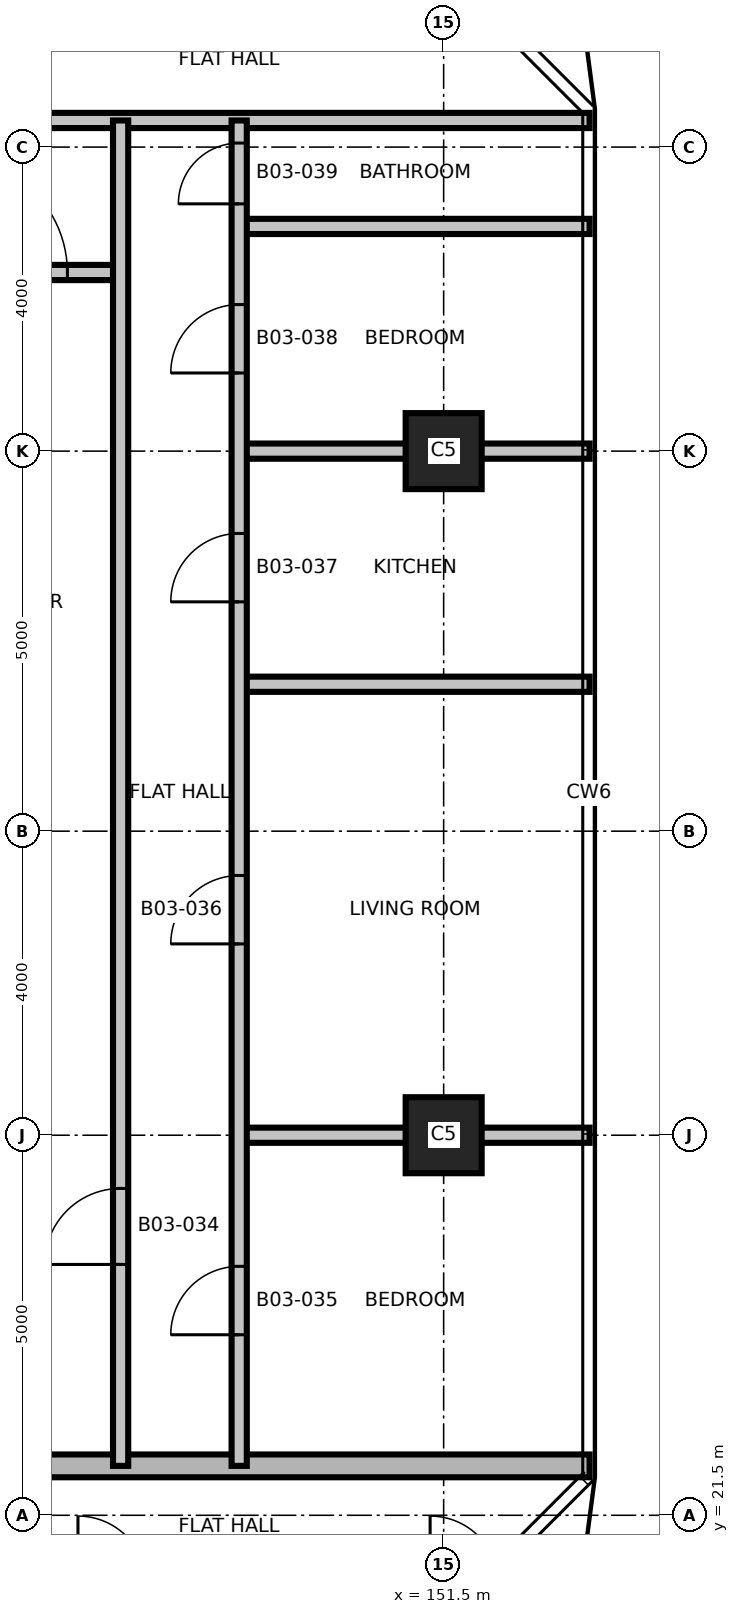
"""IFC4 building model, lengths in metres.
Left out: names, types, materials, properties, quantities, classifications, styles, units other than length and angle.
Written with IfcOpenShell. Run it as: python <this file> out.ifc"""

import sys

from ifc_helpers import new_model, si_unit, direction, frame, frame_2d, origin, origin_2d, place, context, subcontext, project, spatial, rectangle, extrude, element, fill, save


model = new_model("IFC4")
c1 = context("Model", 3, precision=1e-05, world=origin(), true_north=direction((0.0, 1.0)))
c2 = subcontext(c1, "Body", "Model", "MODEL_VIEW")
j1 = project(units=[si_unit("LENGTHUNIT", "METRE"), si_unit("PLANEANGLEUNIT", "RADIAN")], contexts=[c1])
p1 = place(None, origin())
s1 = spatial("IfcSite", under=j1, at=p1, CompositionType="ELEMENT")
p2 = place(p1, origin())
s2 = spatial("IfcBuilding", under=s1, at=p2, CompositionType="ELEMENT")
p3 = place(p2, frame((0.0, 0.0, 52.0)))
s3 = spatial("IfcBuildingStorey", under=s2, at=p3, CompositionType="ELEMENT", Elevation=52.0)
for number, where, z_axis, x_axis in (
    (1, (151.5, 26.5, 0.0), (0.0, 0.0, 1.0), (1.0, 0.0, 0.0)),
    (2, (151.5, 35.5, 0.0), (0.0, 0.0, 1.0), (1.0, 0.0, 0.0)),
):
    element("IfcColumn", number, at=place(p3, frame(where, z_axis=z_axis, x_axis=x_axis)), inside=s3, PredefinedType="COLUMN", context=c2, shape_type="SweptSolid", body=[
        extrude(rectangle(XDim=1.0, YDim=1.0, at=origin_2d()), origin(), (0.0, 0.0, 1.0), 3.7),
    ])
p4 = place(p3, frame((119.58, 22.15, 0.0), z_axis=(0.0, 0.0, 1.0), x_axis=(1.0, 0.0, 0.0)))
e3 = element("IfcWall", 3, at=p4, inside=s3, PredefinedType="SHEAR", context=c2, shape_type="SweptSolid", body=[
    extrude(rectangle(XDim=33.84, YDim=0.3, at=frame_2d((16.92, 0.0))), origin(), (0.0, 0.0, 1.0), 3.4),
])
p5 = place(p4, frame((23.17, 0.0, 0.0)))
e4 = element("IfcOpeningElement", 4, at=p5, cuts=e3, PredefinedType="OPENING", context=c2, shape_type="SweptSolid", body=[
    extrude(rectangle(XDim=1.0, YDim=2.1, at=frame_2d((0.5, 1.05))), frame((0.0, 0.16, 0.0), z_axis=(0.0, -1.0, 0.0), x_axis=(1.0, 0.0, 0.0)), (0.0, 0.0, 1.0), 0.32),
])
p6 = place(p4, frame((11.52, 0.0, 0.0)))
e5 = element("IfcOpeningElement", 5, at=p6, cuts=e3, PredefinedType="OPENING", context=c2, shape_type="SweptSolid", body=[
    extrude(rectangle(XDim=1.0, YDim=2.1, at=frame_2d((0.5, 1.05))), frame((0.0, 0.16, 0.0), z_axis=(0.0, -1.0, 0.0), x_axis=(1.0, 0.0, 0.0)), (0.0, 0.0, 1.0), 0.32),
])
p7 = place(p4, frame((25.07, 0.0, 0.0)))
e6 = element("IfcOpeningElement", 6, at=p7, cuts=e3, PredefinedType="OPENING", context=c2, shape_type="SweptSolid", body=[
    extrude(rectangle(XDim=1.0, YDim=2.1, at=frame_2d((0.5, 1.05))), frame((0.0, 0.16, 0.0), z_axis=(0.0, -1.0, 0.0), x_axis=(1.0, 0.0, 0.0)), (0.0, 0.0, 1.0), 0.32),
])
p8 = place(p4, frame((17.17, 0.0, 0.0)))
e7 = element("IfcOpeningElement", 7, at=p8, cuts=e3, PredefinedType="OPENING", context=c2, shape_type="SweptSolid", body=[
    extrude(rectangle(XDim=0.9, YDim=2.1, at=frame_2d((0.45, 1.05))), frame((0.0, 0.16, 0.0), z_axis=(0.0, -1.0, 0.0), x_axis=(1.0, 0.0, 0.0)), (0.0, 0.0, 1.0), 0.32),
])
for number, where, z_axis, x_axis in (
    (8, (148.81, 26.5, 0.0), (0.0, 0.0, 1.0), (1.0, 0.0, 0.0)),
    (9, (148.81, 32.433, 0.0), (0.0, 0.0, 1.0), (1.0, 0.0, 0.0)),
    (10, (148.81, 35.5, 0.0), (0.0, 0.0, 1.0), (1.0, 0.0, 0.0)),
):
    element("IfcWall", number, at=place(p3, frame(where, z_axis=z_axis, x_axis=x_axis)), inside=s3, PredefinedType="PARTITIONING", context=c2, shape_type="SweptSolid", body=[
        extrude(rectangle(XDim=4.61, YDim=0.2, at=frame_2d((2.305, 0.0))), origin(), (0.0, 0.0, 1.0), 3.4),
    ])
p9 = place(p3, frame((144.02, 37.85, 0.0), z_axis=(0.0, 0.0, 1.0), x_axis=(1.0, 0.0, 0.0)))
e11 = element("IfcWall", 11, at=p9, inside=s3, PredefinedType="PARTITIONING", context=c2, shape_type="SweptSolid", body=[
    extrude(rectangle(XDim=3.23, YDim=0.2, at=frame_2d((1.615, 0.0))), origin(), (0.0, 0.0, 1.0), 3.4),
])
p10 = place(p9, frame((1.03, 0.0, 0.0)))
e12 = element("IfcOpeningElement", 12, at=p10, cuts=e11, PredefinedType="OPENING", context=c2, shape_type="SweptSolid", body=[
    extrude(rectangle(XDim=1.5, YDim=2.1, at=frame_2d((0.75, 1.05))), frame((0.0, 0.11, 0.0), z_axis=(0.0, -1.0, 0.0), x_axis=(1.0, 0.0, 0.0)), (0.0, 0.0, 1.0), 0.22),
])
p11 = place(p3, frame((148.81, 38.456, 0.0), z_axis=(0.0, 0.0, 1.0), x_axis=(1.0, 0.0, 0.0)))
e13 = element("IfcWall", 13, at=p11, inside=s3, PredefinedType="PARTITIONING", context=c2, shape_type="SweptSolid", body=[
    extrude(rectangle(XDim=4.61, YDim=0.2, at=frame_2d((2.305, 0.0))), origin(), (0.0, 0.0, 1.0), 3.4),
])
p12 = place(p3, frame((119.58, 39.85, 0.0), z_axis=(0.0, 0.0, 1.0), x_axis=(1.0, 0.0, 0.0)))
e14 = element("IfcWall", 14, at=p12, inside=s3, PredefinedType="PARTITIONING", context=c2, shape_type="SweptSolid", body=[
    extrude(rectangle(XDim=33.84, YDim=0.2, at=frame_2d((16.92, 0.0))), origin(), (0.0, 0.0, 1.0), 3.4),
])
p13 = place(p12, frame((15.27, 0.0, 0.0)))
e15 = element("IfcOpeningElement", 15, at=p13, cuts=e14, PredefinedType="OPENING", context=c2, shape_type="SweptSolid", body=[
    extrude(rectangle(XDim=1.0, YDim=2.1, at=frame_2d((0.5, 1.05))), frame((0.0, 0.11, 0.0), z_axis=(0.0, -1.0, 0.0), x_axis=(1.0, 0.0, 0.0)), (0.0, 0.0, 1.0), 0.22),
])
p14 = place(p12, frame((25.07, 0.0, 0.0)))
e16 = element("IfcOpeningElement", 16, at=p14, cuts=e14, PredefinedType="OPENING", context=c2, shape_type="SweptSolid", body=[
    extrude(rectangle(XDim=1.0, YDim=2.1, at=frame_2d((0.5, 1.05))), frame((0.0, 0.11, 0.0), z_axis=(0.0, -1.0, 0.0), x_axis=(1.0, 0.0, 0.0)), (0.0, 0.0, 1.0), 0.22),
])
p15 = place(p3, frame((147.25, 22.15, 0.0), z_axis=(0.0, 0.0, 1.0), x_axis=(0.0, 1.0, 0.0)))
e17 = element("IfcWall", 17, at=p15, inside=s3, PredefinedType="PARTITIONING", context=c2, shape_type="SweptSolid", body=[
    extrude(rectangle(XDim=17.7, YDim=0.2, at=frame_2d((8.85, 0.0))), origin(), (0.0, 0.0, 1.0), 3.4),
])
p16 = place(p15, frame((2.65, 0.0, 0.0)))
e18 = element("IfcOpeningElement", 18, at=p16, cuts=e17, PredefinedType="OPENING", context=c2, shape_type="SweptSolid", body=[
    extrude(rectangle(XDim=1.0, YDim=2.1, at=frame_2d((0.5, 1.05))), frame((0.0, 0.11, 0.0), z_axis=(0.0, -1.0, 0.0), x_axis=(1.0, 0.0, 0.0)), (0.0, 0.0, 1.0), 0.22),
])
p17 = place(p3, frame((148.81, 22.15, 0.0), z_axis=(0.0, 0.0, 1.0), x_axis=(0.0, 1.0, 0.0)))
e19 = element("IfcWall", 19, at=p17, inside=s3, PredefinedType="PARTITIONING", context=c2, shape_type="SweptSolid", body=[
    extrude(rectangle(XDim=17.7, YDim=0.2, at=frame_2d((8.85, 0.0))), origin(), (0.0, 0.0, 1.0), 3.4),
])
p18 = place(p17, frame((1.725, 0.0, 0.0)))
e20 = element("IfcOpeningElement", 20, at=p18, cuts=e19, PredefinedType="OPENING", context=c2, shape_type="SweptSolid", body=[
    extrude(rectangle(XDim=0.9, YDim=2.1, at=frame_2d((0.45, 1.05))), frame((0.0, 0.11, 0.0), z_axis=(0.0, -1.0, 0.0), x_axis=(1.0, 0.0, 0.0)), (0.0, 0.0, 1.0), 0.22),
])
p19 = place(p17, frame((6.867, 0.0, 0.0)))
e21 = element("IfcOpeningElement", 21, at=p19, cuts=e19, PredefinedType="OPENING", context=c2, shape_type="SweptSolid", body=[
    extrude(rectangle(XDim=0.9, YDim=2.1, at=frame_2d((0.45, 1.05))), frame((0.0, 0.11, 0.0), z_axis=(0.0, -1.0, 0.0), x_axis=(1.0, 0.0, 0.0)), (0.0, 0.0, 1.0), 0.22),
])
p20 = place(p17, frame((11.367, 0.0, 0.0)))
e22 = element("IfcOpeningElement", 22, at=p20, cuts=e19, PredefinedType="OPENING", context=c2, shape_type="SweptSolid", body=[
    extrude(rectangle(XDim=0.9, YDim=2.1, at=frame_2d((0.45, 1.05))), frame((0.0, 0.11, 0.0), z_axis=(0.0, -1.0, 0.0), x_axis=(1.0, 0.0, 0.0)), (0.0, 0.0, 1.0), 0.22),
])
p21 = place(p17, frame((14.378, 0.0, 0.0)))
e23 = element("IfcOpeningElement", 23, at=p21, cuts=e19, PredefinedType="OPENING", context=c2, shape_type="SweptSolid", body=[
    extrude(rectangle(XDim=0.9, YDim=2.1, at=frame_2d((0.45, 1.05))), frame((0.0, 0.11, 0.0), z_axis=(0.0, -1.0, 0.0), x_axis=(1.0, 0.0, 0.0)), (0.0, 0.0, 1.0), 0.22),
])
p22 = place(p17, frame((16.603, 0.0, 0.0)))
e24 = element("IfcOpeningElement", 24, at=p22, cuts=e19, PredefinedType="OPENING", context=c2, shape_type="SweptSolid", body=[
    extrude(rectangle(XDim=0.8, YDim=2.1, at=frame_2d((0.4, 1.05))), frame((0.0, 0.11, 0.0), z_axis=(0.0, -1.0, 0.0), x_axis=(1.0, 0.0, 0.0)), (0.0, 0.0, 1.0), 0.22),
])
p23 = place(p10, origin())
e25 = element("IfcDoor", 25, at=p23, inside=s3, OperationType="SINGLE_SWING_LEFT", PredefinedType="DOOR", context=c2, shape_type="SweptSolid", body=[
    extrude(rectangle(XDim=1.5, YDim=2.1, at=frame_2d((0.75, 1.05))), frame((0.0, 0.025, 0.0), z_axis=(0.0, -1.0, 0.0), x_axis=(1.0, 0.0, 0.0)), (0.0, 0.0, 1.0), 0.05),
])
fill(e12, e25)
p24 = place(p16, origin())
e26 = element("IfcDoor", 26, at=p24, inside=s3, OperationType="SINGLE_SWING_RIGHT", PredefinedType="DOOR", context=c2, shape_type="SweptSolid", body=[
    extrude(rectangle(XDim=1.0, YDim=2.1, at=frame_2d((0.5, 1.05))), frame((0.0, 0.025, 0.0), z_axis=(0.0, -1.0, 0.0), x_axis=(1.0, 0.0, 0.0)), (0.0, 0.0, 1.0), 0.05),
])
fill(e18, e26)
p25 = place(p18, origin())
e27 = element("IfcDoor", 27, at=p25, inside=s3, OperationType="SINGLE_SWING_LEFT", PredefinedType="DOOR", context=c2, shape_type="SweptSolid", body=[
    extrude(rectangle(XDim=0.9, YDim=2.1, at=frame_2d((0.45, 1.05))), frame((0.0, 0.025, 0.0), z_axis=(0.0, -1.0, 0.0), x_axis=(1.0, 0.0, 0.0)), (0.0, 0.0, 1.0), 0.05),
])
fill(e20, e27)
p26 = place(p19, origin())
e28 = element("IfcDoor", 28, at=p26, inside=s3, OperationType="SINGLE_SWING_RIGHT", PredefinedType="DOOR", context=c2, shape_type="SweptSolid", body=[
    extrude(rectangle(XDim=0.9, YDim=2.1, at=frame_2d((0.45, 1.05))), frame((0.0, 0.025, 0.0), z_axis=(0.0, -1.0, 0.0), x_axis=(1.0, 0.0, 0.0)), (0.0, 0.0, 1.0), 0.05),
])
fill(e21, e28)
p27 = place(p20, origin())
e29 = element("IfcDoor", 29, at=p27, inside=s3, OperationType="SINGLE_SWING_LEFT", PredefinedType="DOOR", context=c2, shape_type="SweptSolid", body=[
    extrude(rectangle(XDim=0.9, YDim=2.1, at=frame_2d((0.45, 1.05))), frame((0.0, 0.025, 0.0), z_axis=(0.0, -1.0, 0.0), x_axis=(1.0, 0.0, 0.0)), (0.0, 0.0, 1.0), 0.05),
])
fill(e22, e29)
p28 = place(p21, origin())
e30 = element("IfcDoor", 30, at=p28, inside=s3, OperationType="SINGLE_SWING_RIGHT", PredefinedType="DOOR", context=c2, shape_type="SweptSolid", body=[
    extrude(rectangle(XDim=0.9, YDim=2.1, at=frame_2d((0.45, 1.05))), frame((0.0, 0.025, 0.0), z_axis=(0.0, -1.0, 0.0), x_axis=(1.0, 0.0, 0.0)), (0.0, 0.0, 1.0), 0.05),
])
fill(e23, e30)
p29 = place(p22, origin())
e31 = element("IfcDoor", 31, at=p29, inside=s3, OperationType="SINGLE_SWING_LEFT", PredefinedType="DOOR", context=c2, shape_type="SweptSolid", body=[
    extrude(rectangle(XDim=0.8, YDim=2.1, at=frame_2d((0.4, 1.05))), frame((0.0, 0.025, 0.0), z_axis=(0.0, -1.0, 0.0), x_axis=(1.0, 0.0, 0.0)), (0.0, 0.0, 1.0), 0.05),
])
fill(e24, e31)
save(model, sys.argv[1])
